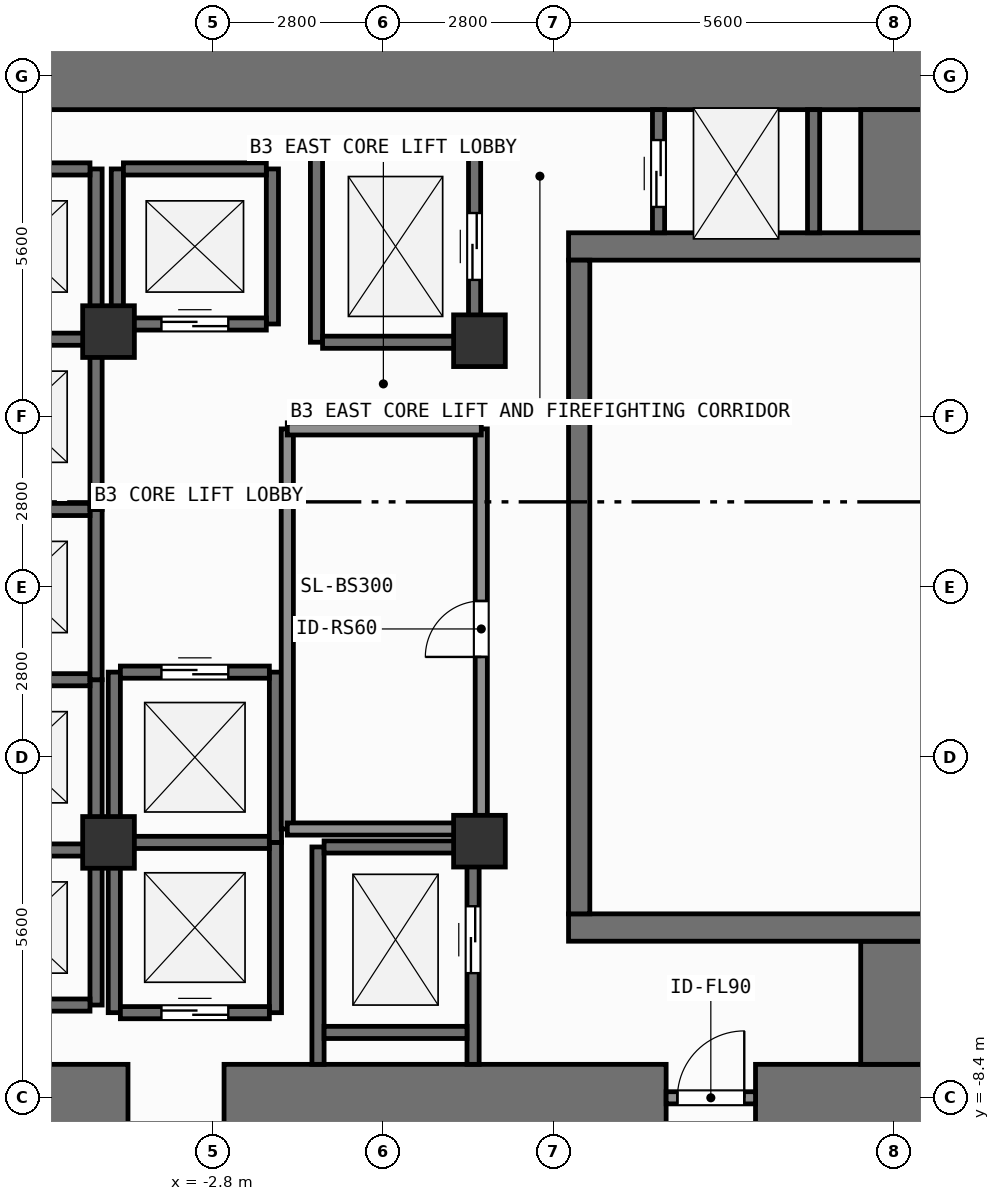
"""IFC4 building model, lengths in metres.
Left out: names, types, materials, properties, quantities, classifications, styles, units other than length and angle.
Written with IfcOpenShell. Run it as: python <this file> out.ifc"""

import sys

from ifc_helpers import new_model, si_unit, direction, frame, frame_2d, origin, origin_2d, place, context, subcontext, project, spatial, rectangle, extrude, element, fill, save


model = new_model("IFC4")
c1 = context("Model", 3, precision=1e-05, world=origin(), true_north=direction((0.0, 1.0)))
c2 = subcontext(c1, "Body", "Model", "MODEL_VIEW")
j1 = project(units=[si_unit("LENGTHUNIT", "METRE"), si_unit("PLANEANGLEUNIT", "RADIAN")], contexts=[c1])
p1 = place(None, origin())
s1 = spatial("IfcSite", under=j1, at=p1, CompositionType="ELEMENT")
p2 = place(p1, origin())
s2 = spatial("IfcBuilding", under=s1, at=p2, CompositionType="ELEMENT")
p3 = place(p2, frame((0.0, 0.0, -12.6)))
s3 = spatial("IfcBuildingStorey", under=s2, at=p3, CompositionType="ELEMENT", Elevation=-12.6)
p4 = place(p3, frame((-7.55, -8.4, 0.0), z_axis=(0.0, 0.0, 1.0), x_axis=(1.0, 0.0, 0.0)))
e1 = element("IfcWall", 1, at=p4, inside=s3, PredefinedType="SHEAR", context=c2, shape_type="SweptSolid", body=[
    extrude(rectangle(XDim=3.35, YDim=1.1, at=frame_2d((1.675, 0.0))), origin(), (0.0, 0.0, 1.0), 4.2),
])
p5 = place(p3, frame((-2.62, -8.4, 0.0), z_axis=(0.0, 0.0, 1.0), x_axis=(1.0, 0.0, 0.0)))
e2 = element("IfcWall", 2, at=p5, inside=s3, PredefinedType="SHEAR", context=c2, shape_type="SweptSolid", body=[
    extrude(rectangle(XDim=7.27, YDim=1.1, at=frame_2d((3.635, 0.0))), origin(), (0.0, 0.0, 1.0), 4.2),
])
p6 = place(p3, frame((6.12, -8.4, 0.0), z_axis=(0.0, 0.0, 1.0), x_axis=(1.0, 0.0, 0.0)))
e3 = element("IfcWall", 3, at=p6, inside=s3, PredefinedType="SHEAR", context=c2, shape_type="SweptSolid", body=[
    extrude(rectangle(XDim=2.83, YDim=1.1, at=frame_2d((1.415, 0.0))), origin(), (0.0, 0.0, 1.0), 4.2),
])
p7 = place(p3, frame((-7.55, 8.4, 0.0), z_axis=(0.0, 0.0, 1.0), x_axis=(1.0, 0.0, 0.0)))
e4 = element("IfcWall", 4, at=p7, inside=s3, PredefinedType="SHEAR", context=c2, shape_type="SweptSolid", body=[
    extrude(rectangle(XDim=16.5, YDim=1.1, at=frame_2d((8.25, 0.0))), origin(), (0.0, 0.0, 1.0), 4.2),
])
for number, where, z_axis, x_axis in (
    (5, (8.4, -7.85, 0.0), (0.0, 0.0, 1.0), (0.0, 1.0, 0.0)),
    (6, (8.4, 5.825, 0.0), (0.0, 0.0, 1.0), (0.0, 1.0, 0.0)),
):
    element("IfcWall", number, at=place(p3, frame(where, z_axis=z_axis, x_axis=x_axis)), inside=s3, PredefinedType="SHEAR", context=c2, shape_type="SweptSolid", body=[
        extrude(rectangle(XDim=2.025, YDim=1.1, at=frame_2d((1.013, 0.0))), origin(), (0.0, 0.0, 1.0), 4.2),
    ])
for number, where, z_axis, x_axis in (
    (7, (3.045, -5.6, 0.0), (0.0, 0.0, 1.0), (1.0, 0.0, 0.0)),
    (8, (3.045, 5.6, 0.0), (0.0, 0.0, 1.0), (1.0, 0.0, 0.0)),
):
    element("IfcWall", number, at=place(p3, frame(where, z_axis=z_axis, x_axis=x_axis)), inside=s3, PredefinedType="SHEAR", context=c2, shape_type="SweptSolid", body=[
        extrude(rectangle(XDim=5.905, YDim=0.45, at=frame_2d((2.953, 0.0))), origin(), (0.0, 0.0, 1.0), 4.2),
    ])
p8 = place(p3, frame((3.22, -5.375, 0.0), z_axis=(0.0, 0.0, 1.0), x_axis=(0.0, 1.0, 0.0)))
e9 = element("IfcWall", 9, at=p8, inside=s3, PredefinedType="SHEAR", context=c2, shape_type="SweptSolid", body=[
    extrude(rectangle(XDim=10.75, YDim=0.35, at=frame_2d((5.375, 0.0))), origin(), (0.0, 0.0, 1.0), 4.2),
])
for number, where, z_axis, x_axis in (
    (10, (-4.52, -4.2, 0.0), (0.0, 0.0, 1.0), (1.0, 0.0, 0.0)),
    (11, (1.58, -4.18, 0.0), (0.0, 0.0, 1.0), (1.0, 0.0, 0.0)),
    (12, (1.58, 4.05, 0.0), (0.0, 0.0, 1.0), (1.0, 0.0, 0.0)),
    (13, (-4.52, 4.2, 0.0), (0.0, 0.0, 1.0), (1.0, 0.0, 0.0)),
):
    element("IfcColumn", number, at=place(p3, frame(where, z_axis=z_axis, x_axis=x_axis)), inside=s3, PredefinedType="COLUMN", context=c2, shape_type="SweptSolid", body=[
        extrude(rectangle(XDim=0.85, YDim=0.85, at=origin_2d()), origin(), (0.0, 0.0, 1.0), 4.2),
    ])
p9 = place(p3, frame((-4.725, -6.875, 0.0), z_axis=(0.0, 0.0, 1.0), x_axis=(0.0, 1.0, 0.0)))
e14 = element("IfcWall", 14, at=p9, inside=s3, PredefinedType="SHEAR", context=c2, shape_type="SweptSolid", body=[
    extrude(rectangle(XDim=2.55, YDim=0.2, at=frame_2d((1.275, 0.0))), origin(), (0.0, 0.0, 1.0), 3.94),
])
for number, where, z_axis, x_axis in (
    (15, (-7.175, -6.875, 0.0), (0.0, 0.0, 1.0), (1.0, 0.0, 0.0)),
    (16, (-7.175, -4.325, 0.0), (0.0, 0.0, 1.0), (1.0, 0.0, 0.0)),
):
    element("IfcWall", number, at=place(p3, frame(where, z_axis=z_axis, x_axis=x_axis)), inside=s3, PredefinedType="SHEAR", context=c2, shape_type="SweptSolid", body=[
        extrude(rectangle(XDim=2.35, YDim=0.2, at=frame_2d((1.175, 0.0))), origin(), (0.0, 0.0, 1.0), 3.94),
    ])
p10 = place(p3, frame((-4.725, -4.325, 0.0), z_axis=(0.0, 0.0, 1.0), x_axis=(0.0, 1.0, 0.0)))
e17 = element("IfcWall", 17, at=p10, inside=s3, PredefinedType="SHEAR", context=c2, shape_type="SweptSolid", body=[
    extrude(rectangle(XDim=2.8, YDim=0.2, at=frame_2d((1.4, 0.0))), origin(), (0.0, 0.0, 1.0), 3.94),
])
p11 = place(p3, frame((-7.175, -1.525, 0.0), z_axis=(0.0, 0.0, 1.0), x_axis=(1.0, 0.0, 0.0)))
e18 = element("IfcWall", 18, at=p11, inside=s3, PredefinedType="SHEAR", context=c2, shape_type="SweptSolid", body=[
    extrude(rectangle(XDim=2.35, YDim=0.2, at=frame_2d((1.175, 0.0))), origin(), (0.0, 0.0, 1.0), 3.94),
])
p12 = place(p3, frame((-4.725, -1.525, 0.0), z_axis=(0.0, 0.0, 1.0), x_axis=(0.0, 1.0, 0.0)))
e19 = element("IfcWall", 19, at=p12, inside=s3, PredefinedType="SHEAR", context=c2, shape_type="SweptSolid", body=[
    extrude(rectangle(XDim=2.8, YDim=0.2, at=frame_2d((1.4, 0.0))), origin(), (0.0, 0.0, 1.0), 3.94),
])
p13 = place(p3, frame((-7.175, 1.275, 0.0), z_axis=(0.0, 0.0, 1.0), x_axis=(1.0, 0.0, 0.0)))
e20 = element("IfcWall", 20, at=p13, inside=s3, PredefinedType="SHEAR", context=c2, shape_type="SweptSolid", body=[
    extrude(rectangle(XDim=2.35, YDim=0.2, at=frame_2d((1.175, 0.0))), origin(), (0.0, 0.0, 1.0), 3.94),
])
p14 = place(p3, frame((-4.725, 1.275, 0.0), z_axis=(0.0, 0.0, 1.0), x_axis=(0.0, 1.0, 0.0)))
e21 = element("IfcWall", 21, at=p14, inside=s3, PredefinedType="SHEAR", context=c2, shape_type="SweptSolid", body=[
    extrude(rectangle(XDim=2.8, YDim=0.2, at=frame_2d((1.4, 0.0))), origin(), (0.0, 0.0, 1.0), 3.94),
])
p15 = place(p3, frame((-7.175, 4.075, 0.0), z_axis=(0.0, 0.0, 1.0), x_axis=(1.0, 0.0, 0.0)))
e22 = element("IfcWall", 22, at=p15, inside=s3, PredefinedType="SHEAR", context=c2, shape_type="SweptSolid", body=[
    extrude(rectangle(XDim=2.35, YDim=0.2, at=frame_2d((1.175, 0.0))), origin(), (0.0, 0.0, 1.0), 3.94),
])
p16 = place(p3, frame((-4.725, 4.075, 0.0), z_axis=(0.0, 0.0, 1.0), x_axis=(0.0, 1.0, 0.0)))
e23 = element("IfcWall", 23, at=p16, inside=s3, PredefinedType="SHEAR", context=c2, shape_type="SweptSolid", body=[
    extrude(rectangle(XDim=2.8, YDim=0.2, at=frame_2d((1.4, 0.0))), origin(), (0.0, 0.0, 1.0), 3.94),
])
p17 = place(p3, frame((-7.175, 6.875, 0.0), z_axis=(0.0, 0.0, 1.0), x_axis=(1.0, 0.0, 0.0)))
e24 = element("IfcWall", 24, at=p17, inside=s3, PredefinedType="SHEAR", context=c2, shape_type="SweptSolid", body=[
    extrude(rectangle(XDim=2.35, YDim=0.2, at=frame_2d((1.175, 0.0))), origin(), (0.0, 0.0, 1.0), 3.94),
])
for number, where, z_axis, x_axis in (
    (25, (-4.375, 4.325, 0.0), (0.0, 0.0, 1.0), (0.0, 1.0, 0.0)),
    (26, (-1.825, 4.325, 0.0), (0.0, 0.0, 1.0), (0.0, 1.0, 0.0)),
):
    element("IfcWall", number, at=place(p3, frame(where, z_axis=z_axis, x_axis=x_axis)), inside=s3, PredefinedType="SHEAR", context=c2, shape_type="SweptSolid", body=[
        extrude(rectangle(XDim=2.55, YDim=0.2, at=frame_2d((1.275, 0.0))), origin(), (0.0, 0.0, 1.0), 3.94),
    ])
p18 = place(p3, frame((-4.275, 4.325, 0.0), z_axis=(0.0, 0.0, 1.0), x_axis=(1.0, 0.0, 0.0)))
e27 = element("IfcWall", 27, at=p18, inside=s3, PredefinedType="SHEAR", context=c2, shape_type="SweptSolid", body=[
    extrude(rectangle(XDim=2.35, YDim=0.2, at=frame_2d((1.175, 0.0))), origin(), (0.0, 0.0, 1.0), 3.94),
])
p19 = place(p18, frame((0.625, 0.0, 0.0)))
e28 = element("IfcOpeningElement", 28, at=p19, cuts=e27, PredefinedType="OPENING", context=c2, shape_type="SweptSolid", body=[
    extrude(rectangle(XDim=1.1, YDim=2.2, at=frame_2d((0.55, 1.1))), frame((0.0, 0.11, 0.0), z_axis=(0.0, -1.0, 0.0), x_axis=(1.0, 0.0, 0.0)), (0.0, 0.0, 1.0), 0.22),
])
p20 = place(p3, frame((-4.275, 6.875, 0.0), z_axis=(0.0, 0.0, 1.0), x_axis=(1.0, 0.0, 0.0)))
e29 = element("IfcWall", 29, at=p20, inside=s3, PredefinedType="SHEAR", context=c2, shape_type="SweptSolid", body=[
    extrude(rectangle(XDim=2.35, YDim=0.2, at=frame_2d((1.175, 0.0))), origin(), (0.0, 0.0, 1.0), 3.94),
])
for number, where, z_axis, x_axis in (
    (30, (-4.425, -7.0, 0.0), (0.0, 0.0, 1.0), (0.0, 1.0, 0.0)),
    (31, (-1.775, -7.0, 0.0), (0.0, 0.0, 1.0), (0.0, 1.0, 0.0)),
):
    element("IfcWall", number, at=place(p3, frame(where, z_axis=z_axis, x_axis=x_axis)), inside=s3, PredefinedType="SHEAR", context=c2, shape_type="SweptSolid", body=[
        extrude(rectangle(XDim=2.8, YDim=0.2, at=frame_2d((1.4, 0.0))), origin(), (0.0, 0.0, 1.0), 3.94),
    ])
p21 = place(p3, frame((-4.325, -7.0, 0.0), z_axis=(0.0, 0.0, 1.0), x_axis=(1.0, 0.0, 0.0)))
e32 = element("IfcWall", 32, at=p21, inside=s3, PredefinedType="SHEAR", context=c2, shape_type="SweptSolid", body=[
    extrude(rectangle(XDim=2.45, YDim=0.2, at=frame_2d((1.225, 0.0))), origin(), (0.0, 0.0, 1.0), 3.94),
])
p22 = place(p21, frame((0.675, 0.0, 0.0)))
e33 = element("IfcOpeningElement", 33, at=p22, cuts=e32, PredefinedType="OPENING", context=c2, shape_type="SweptSolid", body=[
    extrude(rectangle(XDim=1.1, YDim=2.2, at=frame_2d((0.55, 1.1))), frame((0.0, 0.11, 0.0), z_axis=(0.0, -1.0, 0.0), x_axis=(1.0, 0.0, 0.0)), (0.0, 0.0, 1.0), 0.22),
])
p23 = place(p3, frame((-4.325, -4.2, 0.0), z_axis=(0.0, 0.0, 1.0), x_axis=(1.0, 0.0, 0.0)))
e34 = element("IfcWall", 34, at=p23, inside=s3, PredefinedType="SHEAR", context=c2, shape_type="SweptSolid", body=[
    extrude(rectangle(XDim=2.45, YDim=0.2, at=frame_2d((1.225, 0.0))), origin(), (0.0, 0.0, 1.0), 3.94),
])
for number, where, z_axis, x_axis in (
    (35, (-4.425, -4.2, 0.0), (0.0, 0.0, 1.0), (0.0, 1.0, 0.0)),
    (36, (-1.775, -4.2, 0.0), (0.0, 0.0, 1.0), (0.0, 1.0, 0.0)),
):
    element("IfcWall", number, at=place(p3, frame(where, z_axis=z_axis, x_axis=x_axis)), inside=s3, PredefinedType="SHEAR", context=c2, shape_type="SweptSolid", body=[
        extrude(rectangle(XDim=2.8, YDim=0.2, at=frame_2d((1.4, 0.0))), origin(), (0.0, 0.0, 1.0), 3.94),
    ])
p24 = place(p3, frame((-4.325, -1.4, 0.0), z_axis=(0.0, 0.0, 1.0), x_axis=(1.0, 0.0, 0.0)))
e37 = element("IfcWall", 37, at=p24, inside=s3, PredefinedType="SHEAR", context=c2, shape_type="SweptSolid", body=[
    extrude(rectangle(XDim=2.45, YDim=0.2, at=frame_2d((1.225, 0.0))), origin(), (0.0, 0.0, 1.0), 3.94),
])
p25 = place(p24, frame((0.675, 0.0, 0.0)))
e38 = element("IfcOpeningElement", 38, at=p25, cuts=e37, PredefinedType="OPENING", context=c2, shape_type="SweptSolid", body=[
    extrude(rectangle(XDim=1.1, YDim=2.2, at=frame_2d((0.55, 1.1))), frame((0.0, 0.11, 0.0), z_axis=(0.0, -1.0, 0.0), x_axis=(1.0, 0.0, 0.0)), (0.0, 0.0, 1.0), 0.22),
])
p26 = place(p3, frame((-1.1, 4.025, 0.0), z_axis=(0.0, 0.0, 1.0), x_axis=(0.0, 1.0, 0.0)))
e39 = element("IfcWall", 39, at=p26, inside=s3, PredefinedType="SHEAR", context=c2, shape_type="SweptSolid", body=[
    extrude(rectangle(XDim=3.15, YDim=0.2, at=frame_2d((1.575, 0.0))), origin(), (0.0, 0.0, 1.0), 3.94),
])
p27 = place(p3, frame((1.5, 4.025, 0.0), z_axis=(0.0, 0.0, 1.0), x_axis=(0.0, 1.0, 0.0)))
e40 = element("IfcWall", 40, at=p27, inside=s3, PredefinedType="SHEAR", context=c2, shape_type="SweptSolid", body=[
    extrude(rectangle(XDim=3.15, YDim=0.2, at=frame_2d((1.575, 0.0))), origin(), (0.0, 0.0, 1.0), 3.94),
])
p28 = place(p27, frame((1.025, 0.0, 0.0)))
e41 = element("IfcOpeningElement", 41, at=p28, cuts=e40, PredefinedType="OPENING", context=c2, shape_type="SweptSolid", body=[
    extrude(rectangle(XDim=1.1, YDim=2.2, at=frame_2d((0.55, 1.1))), frame((0.0, 0.11, 0.0), z_axis=(0.0, -1.0, 0.0), x_axis=(1.0, 0.0, 0.0)), (0.0, 0.0, 1.0), 0.22),
])
for number, where, z_axis, x_axis in (
    (42, (-1.0, 4.025, 0.0), (0.0, 0.0, 1.0), (1.0, 0.0, 0.0)),
    (43, (-1.0, 7.175, 0.0), (0.0, 0.0, 1.0), (1.0, 0.0, 0.0)),
):
    element("IfcWall", number, at=place(p3, frame(where, z_axis=z_axis, x_axis=x_axis)), inside=s3, PredefinedType="SHEAR", context=c2, shape_type="SweptSolid", body=[
        extrude(rectangle(XDim=2.4, YDim=0.2, at=frame_2d((1.2, 0.0))), origin(), (0.0, 0.0, 1.0), 3.94),
    ])
p29 = place(p3, frame((-1.075, -7.85, 0.0), z_axis=(0.0, 0.0, 1.0), x_axis=(0.0, 1.0, 0.0)))
e44 = element("IfcWall", 44, at=p29, inside=s3, PredefinedType="SHEAR", context=c2, shape_type="SweptSolid", body=[
    extrude(rectangle(XDim=3.575, YDim=0.2, at=frame_2d((1.788, 0.0))), origin(), (0.0, 0.0, 1.0), 3.94),
])
p30 = place(p3, frame((1.475, -7.85, 0.0), z_axis=(0.0, 0.0, 1.0), x_axis=(0.0, 1.0, 0.0)))
e45 = element("IfcWall", 45, at=p30, inside=s3, PredefinedType="SHEAR", context=c2, shape_type="SweptSolid", body=[
    extrude(rectangle(XDim=3.575, YDim=0.2, at=frame_2d((1.788, 0.0))), origin(), (0.0, 0.0, 1.0), 3.94),
])
p31 = place(p30, frame((1.5, 0.0, 0.0)))
e46 = element("IfcOpeningElement", 46, at=p31, cuts=e45, PredefinedType="OPENING", context=c2, shape_type="SweptSolid", body=[
    extrude(rectangle(XDim=1.1, YDim=2.2, at=frame_2d((0.55, 1.1))), frame((0.0, 0.11, 0.0), z_axis=(0.0, -1.0, 0.0), x_axis=(1.0, 0.0, 0.0)), (0.0, 0.0, 1.0), 0.22),
])
for number, where, z_axis, x_axis in (
    (47, (-0.975, -7.325, 0.0), (0.0, 0.0, 1.0), (1.0, 0.0, 0.0)),
    (48, (-0.975, -4.275, 0.0), (0.0, 0.0, 1.0), (1.0, 0.0, 0.0)),
):
    element("IfcWall", number, at=place(p3, frame(where, z_axis=z_axis, x_axis=x_axis)), inside=s3, PredefinedType="SHEAR", context=c2, shape_type="SweptSolid", body=[
        extrude(rectangle(XDim=2.35, YDim=0.2, at=frame_2d((1.175, 0.0))), origin(), (0.0, 0.0, 1.0), 3.94),
    ])
p32 = place(p3, frame((4.525, 5.825, 0.0), z_axis=(0.0, 0.0, 1.0), x_axis=(0.0, 1.0, 0.0)))
e49 = element("IfcWall", 49, at=p32, inside=s3, PredefinedType="SHEAR", context=c2, shape_type="SweptSolid", body=[
    extrude(rectangle(XDim=2.025, YDim=0.2, at=frame_2d((1.013, 0.0))), origin(), (0.0, 0.0, 1.0), 3.94),
])
p33 = place(p32, frame((0.425, 0.0, 0.0)))
e50 = element("IfcOpeningElement", 50, at=p33, cuts=e49, PredefinedType="OPENING", context=c2, shape_type="SweptSolid", body=[
    extrude(rectangle(XDim=1.1, YDim=2.2, at=frame_2d((0.55, 1.1))), frame((0.0, 0.11, 0.0), z_axis=(0.0, -1.0, 0.0), x_axis=(1.0, 0.0, 0.0)), (0.0, 0.0, 1.0), 0.22),
])
p34 = place(p3, frame((7.075, 5.825, 0.0), z_axis=(0.0, 0.0, 1.0), x_axis=(0.0, 1.0, 0.0)))
e51 = element("IfcWall", 51, at=p34, inside=s3, PredefinedType="SHEAR", context=c2, shape_type="SweptSolid", body=[
    extrude(rectangle(XDim=2.025, YDim=0.2, at=frame_2d((1.013, 0.0))), origin(), (0.0, 0.0, 1.0), 3.94),
])
p35 = place(p3, frame((4.65, -8.4, 0.0), z_axis=(0.0, 0.0, 1.0), x_axis=(1.0, 0.0, 0.0)))
e52 = element("IfcWall", 52, at=p35, inside=s3, PredefinedType="SOLIDWALL", context=c2, shape_type="SweptSolid", body=[
    extrude(rectangle(XDim=1.47, YDim=0.2, at=frame_2d((0.735, 0.0))), origin(), (0.0, 0.0, 1.0), 2.98),
])
p36 = place(p35, frame((0.185, 0.0, 0.0)))
e53 = element("IfcOpeningElement", 53, at=p36, cuts=e52, PredefinedType="OPENING", context=c2, shape_type="SweptSolid", body=[
    extrude(rectangle(XDim=1.1, YDim=2.15, at=frame_2d((0.55, 1.075))), frame((0.0, 0.11, 0.0), z_axis=(0.0, -1.0, 0.0), x_axis=(1.0, 0.0, 0.0)), (0.0, 0.0, 1.0), 0.22),
])
p37 = place(p3, frame((1.61, -3.98, 0.0), z_axis=(0.0, 0.0, 1.0), x_axis=(0.0, 1.0, 0.0)))
e54 = element("IfcWall", 54, at=p37, inside=s3, PredefinedType="SOLIDWALL", context=c2, shape_type="SweptSolid", body=[
    extrude(rectangle(XDim=6.58, YDim=0.2, at=frame_2d((3.29, 0.0))), origin(), (0.0, 0.0, 1.0), 3.94),
])
p38 = place(p37, frame((2.83, 0.0, 0.0)))
e55 = element("IfcOpeningElement", 55, at=p38, cuts=e54, PredefinedType="OPENING", context=c2, shape_type="SweptSolid", body=[
    extrude(rectangle(XDim=0.92, YDim=2.1, at=frame_2d((0.46, 1.05))), frame((0.0, 0.11, 0.0), z_axis=(0.0, -1.0, 0.0), x_axis=(1.0, 0.0, 0.0)), (0.0, 0.0, 1.0), 0.22),
])
p39 = place(p3, frame((-1.58, -3.98, 0.0), z_axis=(0.0, 0.0, 1.0), x_axis=(0.0, 1.0, 0.0)))
e56 = element("IfcWall", 56, at=p39, inside=s3, PredefinedType="SOLIDWALL", context=c2, shape_type="SweptSolid", body=[
    extrude(rectangle(XDim=6.58, YDim=0.2, at=frame_2d((3.29, 0.0))), origin(), (0.0, 0.0, 1.0), 3.94),
])
for number, where, z_axis, x_axis in (
    (57, (-1.58, -3.98, 0.0), (0.0, 0.0, 1.0), (1.0, 0.0, 0.0)),
    (58, (-1.58, 2.6, 0.0), (0.0, 0.0, 1.0), (1.0, 0.0, 0.0)),
):
    element("IfcWall", number, at=place(p3, frame(where, z_axis=z_axis, x_axis=x_axis)), inside=s3, PredefinedType="SOLIDWALL", context=c2, shape_type="SweptSolid", body=[
        extrude(rectangle(XDim=3.19, YDim=0.2, at=frame_2d((1.595, 0.0))), origin(), (0.0, 0.0, 1.0), 3.94),
    ])
p40 = place(p19, origin())
e59 = element("IfcDoor", 59, at=p40, inside=s3, OperationType="SLIDING_TO_LEFT", PredefinedType="DOOR", context=c2, shape_type="SweptSolid", body=[
    extrude(rectangle(XDim=1.1, YDim=2.2, at=frame_2d((0.55, 1.1))), frame((0.0, 0.025, 0.0), z_axis=(0.0, -1.0, 0.0), x_axis=(1.0, 0.0, 0.0)), (0.0, 0.0, 1.0), 0.05),
])
fill(e28, e59)
p41 = place(p22, origin())
e60 = element("IfcDoor", 60, at=p41, inside=s3, OperationType="SLIDING_TO_LEFT", PredefinedType="DOOR", context=c2, shape_type="SweptSolid", body=[
    extrude(rectangle(XDim=1.1, YDim=2.2, at=frame_2d((0.55, 1.1))), frame((0.0, 0.025, 0.0), z_axis=(0.0, -1.0, 0.0), x_axis=(1.0, 0.0, 0.0)), (0.0, 0.0, 1.0), 0.05),
])
fill(e33, e60)
p42 = place(p25, origin())
e61 = element("IfcDoor", 61, at=p42, inside=s3, OperationType="SLIDING_TO_LEFT", PredefinedType="DOOR", context=c2, shape_type="SweptSolid", body=[
    extrude(rectangle(XDim=1.1, YDim=2.2, at=frame_2d((0.55, 1.1))), frame((0.0, 0.025, 0.0), z_axis=(0.0, -1.0, 0.0), x_axis=(1.0, 0.0, 0.0)), (0.0, 0.0, 1.0), 0.05),
])
fill(e38, e61)
p43 = place(p28, origin())
e62 = element("IfcDoor", 62, at=p43, inside=s3, OperationType="SLIDING_TO_LEFT", PredefinedType="DOOR", context=c2, shape_type="SweptSolid", body=[
    extrude(rectangle(XDim=1.1, YDim=2.2, at=frame_2d((0.55, 1.1))), frame((0.0, 0.025, 0.0), z_axis=(0.0, -1.0, 0.0), x_axis=(1.0, 0.0, 0.0)), (0.0, 0.0, 1.0), 0.05),
])
fill(e41, e62)
p44 = place(p31, origin())
e63 = element("IfcDoor", 63, at=p44, inside=s3, OperationType="SLIDING_TO_LEFT", PredefinedType="DOOR", context=c2, shape_type="SweptSolid", body=[
    extrude(rectangle(XDim=1.1, YDim=2.2, at=frame_2d((0.55, 1.1))), frame((0.0, 0.025, 0.0), z_axis=(0.0, -1.0, 0.0), x_axis=(1.0, 0.0, 0.0)), (0.0, 0.0, 1.0), 0.05),
])
fill(e46, e63)
p45 = place(p33, origin())
e64 = element("IfcDoor", 64, at=p45, inside=s3, OperationType="SLIDING_TO_LEFT", PredefinedType="DOOR", context=c2, shape_type="SweptSolid", body=[
    extrude(rectangle(XDim=1.1, YDim=2.2, at=frame_2d((0.55, 1.1))), frame((0.0, 0.025, 0.0), z_axis=(0.0, -1.0, 0.0), x_axis=(1.0, 0.0, 0.0)), (0.0, 0.0, 1.0), 0.05),
])
fill(e50, e64)
p46 = place(p36, origin())
e65 = element("IfcDoor", 65, at=p46, inside=s3, OperationType="SINGLE_SWING_RIGHT", PredefinedType="DOOR", context=c2, shape_type="SweptSolid", body=[
    extrude(rectangle(XDim=1.1, YDim=2.15, at=frame_2d((0.55, 1.075))), frame((0.0, 0.025, 0.0), z_axis=(0.0, -1.0, 0.0), x_axis=(1.0, 0.0, 0.0)), (0.0, 0.0, 1.0), 0.05),
])
fill(e53, e65)
p47 = place(p38, origin())
e66 = element("IfcDoor", 66, at=p47, inside=s3, OperationType="SINGLE_SWING_LEFT", PredefinedType="DOOR", context=c2, shape_type="SweptSolid", body=[
    extrude(rectangle(XDim=0.92, YDim=2.1, at=frame_2d((0.46, 1.05))), frame((0.0, 0.025, 0.0), z_axis=(0.0, -1.0, 0.0), x_axis=(1.0, 0.0, 0.0)), (0.0, 0.0, 1.0), 0.05),
])
fill(e55, e66)
save(model, sys.argv[1])
